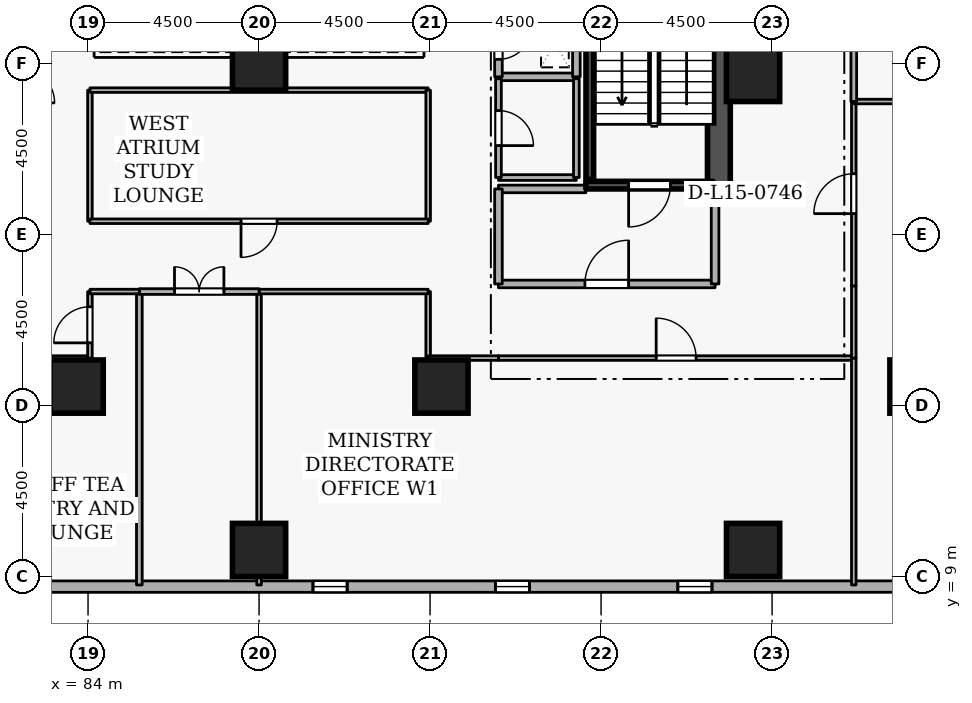
"""IFC4 building model, lengths in metres.
Left out: names, types, materials, properties, quantities, classifications, styles, units other than length and angle.
Written with IfcOpenShell. Run it as: python <this file> out.ifc"""

import sys

from ifc_helpers import new_model, si_unit, direction, frame, frame_2d, origin, origin_2d, place, context, subcontext, project, spatial, rectangle, extrude, element, fill, save


model = new_model("IFC4")
c1 = context("Model", 3, precision=1e-05, world=origin(), true_north=direction((0.0, 1.0)))
c2 = subcontext(c1, "Body", "Model", "MODEL_VIEW")
j1 = project(units=[si_unit("LENGTHUNIT", "METRE"), si_unit("PLANEANGLEUNIT", "RADIAN")], contexts=[c1])
p1 = place(None, origin())
s1 = spatial("IfcSite", under=j1, at=p1, CompositionType="ELEMENT")
p2 = place(p1, origin())
s2 = spatial("IfcBuilding", under=s1, at=p2, CompositionType="ELEMENT")
p3 = place(p2, frame((0.0, 0.0, 60.9)))
s3 = spatial("IfcBuildingStorey", under=s2, at=p3, CompositionType="ELEMENT", Elevation=60.9)
p4 = place(p3, frame((100.6, 19.2, 0.0), z_axis=(0.0, 0.0, 1.0), x_axis=(0.0, 1.0, 0.0)))
e1 = element("IfcWall", 1, at=p4, inside=s3, PredefinedType="SHEAR", context=c2, shape_type="SweptSolid", body=[
    extrude(rectangle(XDim=15.6, YDim=0.6, at=frame_2d((7.8, 0.0))), origin(), (0.0, 0.0, 1.0), 3.6),
])
for number, where, z_axis, x_axis in (
    (2, (105.8, 14.0, 0.0), (0.0, 0.0, 1.0), (1.0, 0.0, 0.0)),
    (3, (101.5, 9.7, 0.0), (0.0, 0.0, 1.0), (1.0, 0.0, 0.0)),
    (4, (88.5, 9.7, 0.0), (0.0, 0.0, 1.0), (1.0, 0.0, 0.0)),
    (5, (93.3, 14.0, 0.0), (0.0, 0.0, 1.0), (1.0, 0.0, 0.0)),
    (6, (83.7, 14.0, 0.0), (0.0, 0.0, 1.0), (1.0, 0.0, 0.0)),
    (7, (101.5, 22.2, 0.0), (0.0, 0.0, 1.0), (1.0, 0.0, 0.0)),
    (8, (88.5, 22.5, 0.0), (0.0, 0.0, 1.0), (1.0, 0.0, 0.0)),
):
    element("IfcColumn", number, at=place(p3, frame(where, z_axis=z_axis, x_axis=x_axis)), inside=s3, PredefinedType="COLUMN", context=c2, shape_type="SweptSolid", body=[
        extrude(rectangle(XDim=1.4, YDim=1.4, at=origin_2d()), origin(), (0.0, 0.0, 1.0), 3.6),
    ])
p5 = place(p3, frame((72.819, 8.735, 0.0), z_axis=(0.0, 0.0, 1.0), x_axis=(0.999999998209, 5.985515e-05, 0.0)))
e9 = element("IfcWall", 9, at=p5, inside=s3, PredefinedType="STANDARD", context=c2, shape_type="SweptSolid", body=[
    extrude(rectangle(XDim=36.71, YDim=0.3, at=frame_2d((18.355, 0.0))), origin(), (0.0, 0.0, 1.0), 2.7),
])
p6 = place(p5, frame((7.5, 0.0, 0.72)))
e10 = element("IfcOpeningElement", 10, at=p6, cuts=e9, PredefinedType="OPENING", context=c2, shape_type="SweptSolid", body=[
    extrude(rectangle(XDim=0.9, YDim=1.75, at=frame_2d((0.45, 0.875))), frame((0.0, 0.16, 0.0), z_axis=(0.0, -1.0, 0.0), x_axis=(1.0, 0.0, 0.0)), (0.0, 0.0, 1.0), 0.32),
])
p7 = place(p5, frame((17.1, 0.0, 0.72)))
e11 = element("IfcOpeningElement", 11, at=p7, cuts=e9, PredefinedType="OPENING", context=c2, shape_type="SweptSolid", body=[
    extrude(rectangle(XDim=0.9, YDim=1.75, at=frame_2d((0.45, 0.875))), frame((0.0, 0.16, 0.0), z_axis=(0.0, -1.0, 0.0), x_axis=(1.0, 0.0, 0.0)), (0.0, 0.0, 1.0), 0.32),
])
p8 = place(p5, frame((21.9, 0.0, 0.72)))
e12 = element("IfcOpeningElement", 12, at=p8, cuts=e9, PredefinedType="OPENING", context=c2, shape_type="SweptSolid", body=[
    extrude(rectangle(XDim=0.9, YDim=1.75, at=frame_2d((0.45, 0.875))), frame((0.0, 0.16, 0.0), z_axis=(0.0, -1.0, 0.0), x_axis=(1.0, 0.0, 0.0)), (0.0, 0.0, 1.0), 0.32),
])
p9 = place(p5, frame((26.7, 0.0, 0.72)))
e13 = element("IfcOpeningElement", 13, at=p9, cuts=e9, PredefinedType="OPENING", context=c2, shape_type="SweptSolid", body=[
    extrude(rectangle(XDim=0.9, YDim=1.75, at=frame_2d((0.45, 0.875))), frame((0.0, 0.16, 0.0), z_axis=(0.0, -1.0, 0.0), x_axis=(1.0, 0.0, 0.0)), (0.0, 0.0, 1.0), 0.32),
])
p10 = place(p3, frame((100.45, 19.3, 0.0), z_axis=(0.0, 0.0, 1.0), x_axis=(-1.0, 0.0, 0.0)))
e14 = element("IfcWall", 14, at=p10, inside=s3, PredefinedType="SHEAR", context=c2, shape_type="SweptSolid", body=[
    extrude(rectangle(XDim=3.35, YDim=0.2, at=frame_2d((1.675, 0.0))), origin(), (0.0, 0.0, 1.0), 3.6),
])
p11 = place(p10, frame((1.125, 0.0, 0.0)))
e15 = element("IfcOpeningElement", 15, at=p11, cuts=e14, PredefinedType="OPENING", context=c2, shape_type="SweptSolid", body=[
    extrude(rectangle(XDim=1.1, YDim=2.1, at=frame_2d((0.55, 1.05))), frame((0.0, 0.11, 0.0), z_axis=(0.0, -1.0, 0.0), x_axis=(1.0, 0.0, 0.0)), (0.0, 0.0, 1.0), 0.22),
])
p12 = place(p3, frame((97.203, 26.55, 0.0), z_axis=(0.0, 0.0, 1.0), x_axis=(0.0, -1.0, 0.0)))
e16 = element("IfcWall", 16, at=p12, inside=s3, PredefinedType="SHEAR", context=c2, shape_type="SweptSolid", body=[
    extrude(rectangle(XDim=7.1, YDim=0.2, at=frame_2d((3.55, 0.0))), origin(), (0.0, 0.0, 1.0), 3.6),
])
p13 = place(p3, frame((94.8, 16.7, 0.0), z_axis=(0.0, 0.0, 1.0), x_axis=(1.0, 0.0, 0.0)))
e17 = element("IfcWall", 17, at=p13, inside=s3, PredefinedType="STANDARD", context=c2, shape_type="SweptSolid", body=[
    extrude(rectangle(XDim=5.7, YDim=0.2, at=frame_2d((2.85, 0.0))), origin(), (0.0, 0.0, 1.0), 3.34),
])
p14 = place(p13, frame((2.275, 0.0, 0.0)))
e18 = element("IfcOpeningElement", 18, at=p14, cuts=e17, PredefinedType="OPENING", context=c2, shape_type="SweptSolid", body=[
    extrude(rectangle(XDim=1.15, YDim=2.1, at=frame_2d((0.575, 1.05))), frame((0.0, 0.11, 0.0), z_axis=(0.0, -1.0, 0.0), x_axis=(1.0, 0.0, 0.0)), (0.0, 0.0, 1.0), 0.22),
])
p15 = place(p3, frame((100.5, 16.7, 0.0), z_axis=(0.0, 0.0, 1.0), x_axis=(0.0, 1.0, 0.0)))
e19 = element("IfcWall", 19, at=p15, inside=s3, PredefinedType="STANDARD", context=c2, shape_type="SweptSolid", body=[
    extrude(rectangle(XDim=2.5, YDim=0.2, at=frame_2d((1.25, 0.0))), origin(), (0.0, 0.0, 1.0), 3.34),
])
p16 = place(p3, frame((97.1, 19.2, 0.0), z_axis=(0.0, 0.0, 1.0), x_axis=(-1.0, 0.0, 0.0)))
e20 = element("IfcWall", 20, at=p16, inside=s3, PredefinedType="STANDARD", context=c2, shape_type="SweptSolid", body=[
    extrude(rectangle(XDim=2.3, YDim=0.2, at=frame_2d((1.15, 0.0))), origin(), (0.0, 0.0, 1.0), 2.545),
])
p17 = place(p3, frame((94.8, 19.2, 0.0), z_axis=(0.0, 0.0, 1.0), x_axis=(0.0, -1.0, 0.0)))
e21 = element("IfcWall", 21, at=p17, inside=s3, PredefinedType="STANDARD", context=c2, shape_type="SweptSolid", body=[
    extrude(rectangle(XDim=2.5, YDim=0.2, at=frame_2d((1.25, 0.0))), origin(), (0.0, 0.0, 1.0), 3.34),
])
p18 = place(p3, frame((94.8, 22.15, 0.0), z_axis=(0.0, 0.0, 1.0), x_axis=(1.0, 0.0, 0.0)))
e22 = element("IfcWall", 22, at=p18, inside=s3, PredefinedType="STANDARD", context=c2, shape_type="SweptSolid", body=[
    extrude(rectangle(XDim=2.05, YDim=0.2, at=frame_2d((1.025, 0.0))), origin(), (0.0, 0.0, 1.0), 3.34),
])
p19 = place(p3, frame((96.85, 22.15, 0.0), z_axis=(0.0, 0.0, 1.0), x_axis=(0.0, 1.0, 0.0)))
e23 = element("IfcWall", 23, at=p19, inside=s3, PredefinedType="STANDARD", context=c2, shape_type="SweptSolid", body=[
    extrude(rectangle(XDim=1.8, YDim=0.2, at=frame_2d((0.9, 0.0))), origin(), (0.0, 0.0, 1.0), 3.34),
])
p20 = place(p3, frame((94.8, 23.95, 0.0), z_axis=(0.0, 0.0, 1.0), x_axis=(0.0, -1.0, 0.0)))
e24 = element("IfcWall", 24, at=p20, inside=s3, PredefinedType="STANDARD", context=c2, shape_type="SweptSolid", body=[
    extrude(rectangle(XDim=1.8, YDim=0.2, at=frame_2d((0.9, 0.0))), origin(), (0.0, 0.0, 1.0), 3.34),
])
p21 = place(p20, frame((0.46, 0.0, 0.0)))
e25 = element("IfcOpeningElement", 25, at=p21, cuts=e24, PredefinedType="OPENING", context=c2, shape_type="SweptSolid", body=[
    extrude(rectangle(XDim=0.88, YDim=2.04, at=frame_2d((0.44, 1.02))), frame((0.0, 0.11, 0.0), z_axis=(0.0, -1.0, 0.0), x_axis=(1.0, 0.0, 0.0)), (0.0, 0.0, 1.0), 0.22),
])
p22 = place(p3, frame((94.8, 19.5, 0.0), z_axis=(0.0, 0.0, 1.0), x_axis=(1.0, 0.0, 0.0)))
e26 = element("IfcWall", 26, at=p22, inside=s3, PredefinedType="PARTITIONING", context=c2, shape_type="SweptSolid", body=[
    extrude(rectangle(XDim=2.05, YDim=0.15, at=frame_2d((1.025, 0.0))), origin(), (0.0, 0.0, 1.0), 2.545),
])
p23 = place(p3, frame((96.85, 19.5, 0.0), z_axis=(0.0, 0.0, 1.0), x_axis=(0.0, 1.0, 0.0)))
e27 = element("IfcWall", 27, at=p23, inside=s3, PredefinedType="PARTITIONING", context=c2, shape_type="SweptSolid", body=[
    extrude(rectangle(XDim=2.6, YDim=0.15, at=frame_2d((1.3, 0.0))), origin(), (0.0, 0.0, 1.0), 3.34),
])
p24 = place(p3, frame((94.8, 22.1, 0.0), z_axis=(0.0, 0.0, 1.0), x_axis=(0.0, -1.0, 0.0)))
e28 = element("IfcWall", 28, at=p24, inside=s3, PredefinedType="PARTITIONING", context=c2, shape_type="SweptSolid", body=[
    extrude(rectangle(XDim=2.6, YDim=0.15, at=frame_2d((1.3, 0.0))), origin(), (0.0, 0.0, 1.0), 3.34),
])
p25 = place(p24, frame((0.84, 0.0, 0.0)))
e29 = element("IfcOpeningElement", 29, at=p25, cuts=e28, PredefinedType="OPENING", context=c2, shape_type="SweptSolid", body=[
    extrude(rectangle(XDim=0.92, YDim=2.08, at=frame_2d((0.46, 1.04))), frame((0.0, 0.085, 0.0), z_axis=(0.0, -1.0, 0.0), x_axis=(1.0, 0.0, 0.0)), (0.0, 0.0, 1.0), 0.17),
])
p26 = place(p3, frame((92.95, 16.5, 0.0), z_axis=(0.0, 0.0, 1.0), x_axis=(0.0, -1.0, 0.0)))
e30 = element("IfcWall", 30, at=p26, inside=s3, PredefinedType="PARTITIONING", context=c2, shape_type="SweptSolid", body=[
    extrude(rectangle(XDim=1.75, YDim=0.12, at=frame_2d((0.875, 0.0))), origin(), (0.0, 0.0, 1.0), 3.34),
])
p27 = place(p3, frame((92.95, 14.75, 0.0), z_axis=(0.0, 0.0, 1.0), x_axis=(1.0, 0.0, 0.0)))
e31 = element("IfcWall", 31, at=p27, inside=s3, PredefinedType="PARTITIONING", context=c2, shape_type="SweptSolid", body=[
    extrude(rectangle(XDim=1.85, YDim=0.12, at=frame_2d((0.925, 0.0))), origin(), (0.0, 0.0, 1.0), 3.34),
])
p28 = place(p3, frame((94.8, 14.75, 0.0), z_axis=(0.0, 0.0, 1.0), x_axis=(1.0, 0.0, 0.0)))
e32 = element("IfcWall", 32, at=p28, inside=s3, PredefinedType="PARTITIONING", context=c2, shape_type="SweptSolid", body=[
    extrude(rectangle(XDim=9.35, YDim=0.12, at=frame_2d((4.675, 0.0))), origin(), (0.0, 0.0, 1.0), 3.34),
])
p29 = place(p28, frame((4.15, 0.0, 0.0)))
e33 = element("IfcOpeningElement", 33, at=p29, cuts=e32, PredefinedType="OPENING", context=c2, shape_type="SweptSolid", body=[
    extrude(rectangle(XDim=1.05, YDim=2.1, at=frame_2d((0.525, 1.05))), frame((0.0, 0.07, 0.0), z_axis=(0.0, -1.0, 0.0), x_axis=(1.0, 0.0, 0.0)), (0.0, 0.0, 1.0), 0.14),
])
p30 = place(p3, frame((104.15, 14.75, 0.0), z_axis=(0.0, 0.0, 1.0), x_axis=(0.0, -1.0, 0.0)))
e34 = element("IfcWall", 34, at=p30, inside=s3, PredefinedType="PARTITIONING", context=c2, shape_type="SweptSolid", body=[
    extrude(rectangle(XDim=5.97, YDim=0.12, at=frame_2d((2.985, 0.0))), origin(), (0.0, 0.0, 1.0), 3.34),
])
p31 = place(p3, frame((88.5, 8.78, 0.0), z_axis=(0.0, 0.0, 1.0), x_axis=(0.0, 1.0, 0.0)))
e35 = element("IfcWall", 35, at=p31, inside=s3, PredefinedType="PARTITIONING", context=c2, shape_type="SweptSolid", body=[
    extrude(rectangle(XDim=7.72, YDim=0.12, at=frame_2d((3.86, 0.0))), origin(), (0.0, 0.0, 1.0), 2.878),
])
p32 = place(p3, frame((88.5, 16.5, 0.0), z_axis=(0.0, 0.0, 1.0), x_axis=(1.0, 0.0, 0.0)))
e36 = element("IfcWall", 36, at=p32, inside=s3, PredefinedType="PARTITIONING", context=c2, shape_type="SweptSolid", body=[
    extrude(rectangle(XDim=4.45, YDim=0.12, at=frame_2d((2.225, 0.0))), origin(), (0.0, 0.0, 1.0), 3.34),
])
p33 = place(p3, frame((85.35, 8.78, 0.0), z_axis=(0.0, 0.0, 1.0), x_axis=(0.0, 1.0, 0.0)))
e37 = element("IfcWall", 37, at=p33, inside=s3, PredefinedType="PARTITIONING", context=c2, shape_type="SweptSolid", body=[
    extrude(rectangle(XDim=7.72, YDim=0.15, at=frame_2d((3.86, 0.0))), origin(), (0.0, 0.0, 1.0), 3.34),
])
p34 = place(p3, frame((85.35, 16.5, 0.0), z_axis=(0.0, 0.0, 1.0), x_axis=(1.0, 0.0, 0.0)))
e38 = element("IfcWall", 38, at=p34, inside=s3, PredefinedType="PARTITIONING", context=c2, shape_type="SweptSolid", body=[
    extrude(rectangle(XDim=3.15, YDim=0.15, at=frame_2d((1.575, 0.0))), origin(), (0.0, 0.0, 1.0), 3.34),
])
p35 = place(p34, frame((0.925, 0.0, 0.0)))
e39 = element("IfcOpeningElement", 39, at=p35, cuts=e38, PredefinedType="OPENING", context=c2, shape_type="SweptSolid", body=[
    extrude(rectangle(XDim=1.3, YDim=2.12, at=frame_2d((0.65, 1.06))), frame((0.0, 0.085, 0.0), z_axis=(0.0, -1.0, 0.0), x_axis=(1.0, 0.0, 0.0)), (0.0, 0.0, 1.0), 0.17),
])
p36 = place(p3, frame((82.2, 14.75, 0.0), z_axis=(0.0, 0.0, 1.0), x_axis=(1.0, 0.0, 0.0)))
e40 = element("IfcWall", 40, at=p36, inside=s3, PredefinedType="PARTITIONING", context=c2, shape_type="SweptSolid", body=[
    extrude(rectangle(XDim=1.85, YDim=0.12, at=frame_2d((0.925, 0.0))), origin(), (0.0, 0.0, 1.0), 3.34),
])
p37 = place(p3, frame((84.05, 14.75, 0.0), z_axis=(0.0, 0.0, 1.0), x_axis=(0.0, 1.0, 0.0)))
e41 = element("IfcWall", 41, at=p37, inside=s3, PredefinedType="PARTITIONING", context=c2, shape_type="SweptSolid", body=[
    extrude(rectangle(XDim=1.75, YDim=0.12, at=frame_2d((0.875, 0.0))), origin(), (0.0, 0.0, 1.0), 3.34),
])
p38 = place(p37, frame((0.4, 0.0, 0.0)))
e42 = element("IfcOpeningElement", 42, at=p38, cuts=e41, PredefinedType="OPENING", context=c2, shape_type="SweptSolid", body=[
    extrude(rectangle(XDim=0.95, YDim=2.1, at=frame_2d((0.475, 1.05))), frame((0.0, 0.07, 0.0), z_axis=(0.0, -1.0, 0.0), x_axis=(1.0, 0.0, 0.0)), (0.0, 0.0, 1.0), 0.14),
])
p39 = place(p3, frame((84.05, 16.5, 0.0), z_axis=(0.0, 0.0, 1.0), x_axis=(1.0, 0.0, 0.0)))
e43 = element("IfcWall", 43, at=p39, inside=s3, PredefinedType="PARTITIONING", context=c2, shape_type="SweptSolid", body=[
    extrude(rectangle(XDim=1.3, YDim=0.12, at=frame_2d((0.65, 0.0))), origin(), (0.0, 0.0, 1.0), 3.34),
])
p40 = place(p3, frame((84.05, 18.35, 0.0), z_axis=(0.0, 0.0, 1.0), x_axis=(0.0, 1.0, 0.0)))
e44 = element("IfcWall", 44, at=p40, inside=s3, PredefinedType="PARTITIONING", context=c2, shape_type="SweptSolid", body=[
    extrude(rectangle(XDim=3.45, YDim=0.12, at=frame_2d((1.725, 0.0))), origin(), (0.0, 0.0, 1.0), 3.34),
])
p41 = place(p3, frame((84.05, 21.8, 0.0), z_axis=(0.0, 0.0, 1.0), x_axis=(1.0, 0.0, 0.0)))
e45 = element("IfcWall", 45, at=p41, inside=s3, PredefinedType="PARTITIONING", context=c2, shape_type="SweptSolid", body=[
    extrude(rectangle(XDim=8.9, YDim=0.12, at=frame_2d((4.45, 0.0))), origin(), (0.0, 0.0, 1.0), 3.34),
])
p42 = place(p3, frame((92.95, 21.8, 0.0), z_axis=(0.0, 0.0, 1.0), x_axis=(0.0, -1.0, 0.0)))
e46 = element("IfcWall", 46, at=p42, inside=s3, PredefinedType="PARTITIONING", context=c2, shape_type="SweptSolid", body=[
    extrude(rectangle(XDim=3.45, YDim=0.12, at=frame_2d((1.725, 0.0))), origin(), (0.0, 0.0, 1.0), 3.34),
])
p43 = place(p3, frame((92.95, 18.35, 0.0), z_axis=(0.0, 0.0, 1.0), x_axis=(-1.0, 0.0, 0.0)))
e47 = element("IfcWall", 47, at=p43, inside=s3, PredefinedType="PARTITIONING", context=c2, shape_type="SweptSolid", body=[
    extrude(rectangle(XDim=8.9, YDim=0.12, at=frame_2d((4.45, 0.0))), origin(), (0.0, 0.0, 1.0), 3.34),
])
p44 = place(p43, frame((3.975, 0.0, 0.0)))
e48 = element("IfcOpeningElement", 48, at=p44, cuts=e47, PredefinedType="OPENING", context=c2, shape_type="SweptSolid", body=[
    extrude(rectangle(XDim=0.95, YDim=2.1, at=frame_2d((0.475, 1.05))), frame((0.0, 0.07, 0.0), z_axis=(0.0, -1.0, 0.0), x_axis=(1.0, 0.0, 0.0)), (0.0, 0.0, 1.0), 0.14),
])
p45 = place(p3, frame((104.15, 14.75, 0.0), z_axis=(0.0, 0.0, 1.0), x_axis=(0.0, 1.0, 0.0)))
e49 = element("IfcWall", 49, at=p45, inside=s3, PredefinedType="PARTITIONING", context=c2, shape_type="SweptSolid", body=[
    extrude(rectangle(XDim=1.9, YDim=0.12, at=frame_2d((0.95, 0.0))), origin(), (0.0, 0.0, 1.0), 3.34),
])
p46 = place(p3, frame((104.15, 16.65, 0.0), z_axis=(0.0, 0.0, 1.0), x_axis=(0.0, 1.0, 0.0)))
e50 = element("IfcWall", 50, at=p46, inside=s3, PredefinedType="PARTITIONING", context=c2, shape_type="SweptSolid", body=[
    extrude(rectangle(XDim=4.85, YDim=0.12, at=frame_2d((2.425, 0.0))), origin(), (0.0, 0.0, 1.0), 3.34),
])
p47 = place(p46, frame((1.9, 0.0, 0.0)))
e51 = element("IfcOpeningElement", 51, at=p47, cuts=e50, PredefinedType="OPENING", context=c2, shape_type="SweptSolid", body=[
    extrude(rectangle(XDim=1.05, YDim=2.1, at=frame_2d((0.525, 1.05))), frame((0.0, 0.07, 0.0), z_axis=(0.0, -1.0, 0.0), x_axis=(1.0, 0.0, 0.0)), (0.0, 0.0, 1.0), 0.14),
])
p48 = place(p3, frame((104.15, 21.5, 0.0), z_axis=(0.0, 0.0, 1.0), x_axis=(1.0, 0.0, 0.0)))
e52 = element("IfcWall", 52, at=p48, inside=s3, PredefinedType="PARTITIONING", context=c2, shape_type="SweptSolid", body=[
    extrude(rectangle(XDim=8.57, YDim=0.12, at=frame_2d((4.285, 0.0))), origin(), (0.0, 0.0, 1.0), 3.34),
])
p49 = place(p3, frame((104.15, 21.5, 0.0), z_axis=(0.0, 0.0, 1.0), x_axis=(0.0, 1.0, 0.0)))
e53 = element("IfcWall", 53, at=p49, inside=s3, PredefinedType="PARTITIONING", context=c2, shape_type="SweptSolid", body=[
    extrude(rectangle(XDim=11.0, YDim=0.15, at=frame_2d((5.5, 0.0))), origin(), (0.0, 0.0, 1.0), 3.34),
])
p50 = place(p49, frame((3.655, 0.0, 0.0)))
e54 = element("IfcOpeningElement", 54, at=p50, cuts=e53, PredefinedType="OPENING", context=c2, shape_type="SweptSolid", body=[
    extrude(rectangle(XDim=1.05, YDim=2.1, at=frame_2d((0.525, 1.05))), frame((0.0, 0.085, 0.0), z_axis=(0.0, -1.0, 0.0), x_axis=(1.0, 0.0, 0.0)), (0.0, 0.0, 1.0), 0.17),
])
p51 = place(p7, origin())
e55 = element("IfcWindow", 55, at=p51, inside=s3, PartitioningType="SINGLE_PANEL", PredefinedType="WINDOW", context=c2, shape_type="SweptSolid", body=[
    extrude(rectangle(XDim=0.9, YDim=1.75, at=frame_2d((0.45, 0.875))), frame((0.0, 0.03, 0.0), z_axis=(0.0, -1.0, 0.0), x_axis=(1.0, 0.0, 0.0)), (0.0, 0.0, 1.0), 0.06),
])
fill(e11, e55)
p52 = place(p8, origin())
e56 = element("IfcWindow", 56, at=p52, inside=s3, PartitioningType="SINGLE_PANEL", PredefinedType="WINDOW", context=c2, shape_type="SweptSolid", body=[
    extrude(rectangle(XDim=0.9, YDim=1.75, at=frame_2d((0.45, 0.875))), frame((0.0, 0.03, 0.0), z_axis=(0.0, -1.0, 0.0), x_axis=(1.0, 0.0, 0.0)), (0.0, 0.0, 1.0), 0.06),
])
fill(e12, e56)
p53 = place(p9, origin())
e57 = element("IfcWindow", 57, at=p53, inside=s3, PartitioningType="SINGLE_PANEL", PredefinedType="WINDOW", context=c2, shape_type="SweptSolid", body=[
    extrude(rectangle(XDim=0.9, YDim=1.75, at=frame_2d((0.45, 0.875))), frame((0.0, 0.03, 0.0), z_axis=(0.0, -1.0, 0.0), x_axis=(1.0, 0.0, 0.0)), (0.0, 0.0, 1.0), 0.06),
])
fill(e13, e57)
p54 = place(p11, origin())
e58 = element("IfcDoor", 58, at=p54, inside=s3, OperationType="SINGLE_SWING_RIGHT", PredefinedType="DOOR", context=c2, shape_type="SweptSolid", body=[
    extrude(rectangle(XDim=1.1, YDim=2.1, at=frame_2d((0.55, 1.05))), frame((0.0, 0.025, 0.0), z_axis=(0.0, -1.0, 0.0), x_axis=(1.0, 0.0, 0.0)), (0.0, 0.0, 1.0), 0.05),
])
fill(e15, e58)
p55 = place(p14, origin())
e59 = element("IfcDoor", 59, at=p55, inside=s3, OperationType="SINGLE_SWING_RIGHT", PredefinedType="DOOR", context=c2, shape_type="SweptSolid", body=[
    extrude(rectangle(XDim=1.15, YDim=2.1, at=frame_2d((0.575, 1.05))), frame((0.0, 0.025, 0.0), z_axis=(0.0, -1.0, 0.0), x_axis=(1.0, 0.0, 0.0)), (0.0, 0.0, 1.0), 0.05),
])
fill(e18, e59)
p56 = place(p21, origin())
e60 = element("IfcDoor", 60, at=p56, inside=s3, OperationType="SINGLE_SWING_LEFT", PredefinedType="DOOR", context=c2, shape_type="SweptSolid", body=[
    extrude(rectangle(XDim=0.88, YDim=2.04, at=frame_2d((0.44, 1.02))), frame((0.0, 0.025, 0.0), z_axis=(0.0, -1.0, 0.0), x_axis=(1.0, 0.0, 0.0)), (0.0, 0.0, 1.0), 0.05),
])
fill(e25, e60)
p57 = place(p25, origin())
e61 = element("IfcDoor", 61, at=p57, inside=s3, OperationType="SINGLE_SWING_RIGHT", PredefinedType="DOOR", context=c2, shape_type="SweptSolid", body=[
    extrude(rectangle(XDim=0.92, YDim=2.08, at=frame_2d((0.46, 1.04))), frame((0.0, 0.025, 0.0), z_axis=(0.0, -1.0, 0.0), x_axis=(1.0, 0.0, 0.0)), (0.0, 0.0, 1.0), 0.05),
])
fill(e29, e61)
p58 = place(p29, origin())
e62 = element("IfcDoor", 62, at=p58, inside=s3, OperationType="SINGLE_SWING_LEFT", PredefinedType="DOOR", context=c2, shape_type="SweptSolid", body=[
    extrude(rectangle(XDim=1.05, YDim=2.1, at=frame_2d((0.525, 1.05))), frame((0.0, 0.025, 0.0), z_axis=(0.0, -1.0, 0.0), x_axis=(1.0, 0.0, 0.0)), (0.0, 0.0, 1.0), 0.05),
])
fill(e33, e62)
p59 = place(p35, origin())
e63 = element("IfcDoor", 63, at=p59, inside=s3, OperationType="DOUBLE_DOOR_SINGLE_SWING", PredefinedType="DOOR", context=c2, shape_type="SweptSolid", body=[
    extrude(rectangle(XDim=1.3, YDim=2.12, at=frame_2d((0.65, 1.06))), frame((0.0, 0.025, 0.0), z_axis=(0.0, -1.0, 0.0), x_axis=(1.0, 0.0, 0.0)), (0.0, 0.0, 1.0), 0.05),
])
fill(e39, e63)
p60 = place(p38, origin())
e64 = element("IfcDoor", 64, at=p60, inside=s3, OperationType="SINGLE_SWING_LEFT", PredefinedType="DOOR", context=c2, shape_type="SweptSolid", body=[
    extrude(rectangle(XDim=0.95, YDim=2.1, at=frame_2d((0.475, 1.05))), frame((0.0, 0.025, 0.0), z_axis=(0.0, -1.0, 0.0), x_axis=(1.0, 0.0, 0.0)), (0.0, 0.0, 1.0), 0.05),
])
fill(e42, e64)
p61 = place(p44, origin())
e65 = element("IfcDoor", 65, at=p61, inside=s3, OperationType="SINGLE_SWING_RIGHT", PredefinedType="DOOR", context=c2, shape_type="SweptSolid", body=[
    extrude(rectangle(XDim=0.95, YDim=2.1, at=frame_2d((0.475, 1.05))), frame((0.0, 0.025, 0.0), z_axis=(0.0, -1.0, 0.0), x_axis=(1.0, 0.0, 0.0)), (0.0, 0.0, 1.0), 0.05),
])
fill(e48, e65)
p62 = place(p47, origin())
e66 = element("IfcDoor", 66, at=p62, inside=s3, OperationType="SINGLE_SWING_LEFT", PredefinedType="DOOR", context=c2, shape_type="SweptSolid", body=[
    extrude(rectangle(XDim=1.05, YDim=2.1, at=frame_2d((0.525, 1.05))), frame((0.0, 0.025, 0.0), z_axis=(0.0, -1.0, 0.0), x_axis=(1.0, 0.0, 0.0)), (0.0, 0.0, 1.0), 0.05),
])
fill(e51, e66)
save(model, sys.argv[1])
